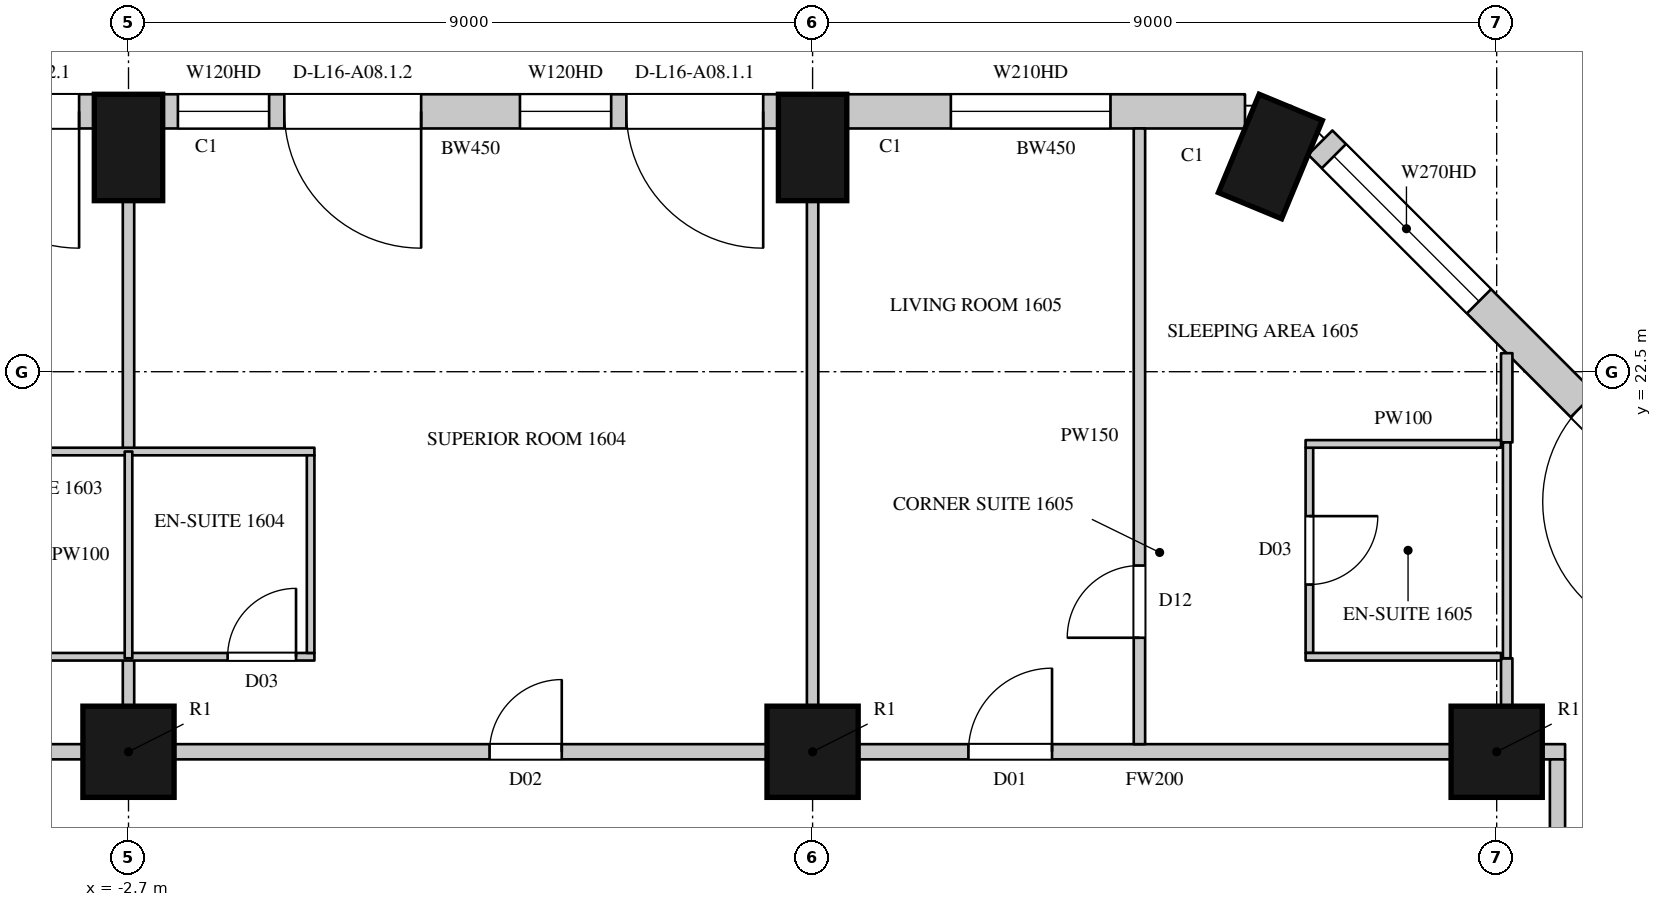
"""IFC4 building model, lengths in metres.
Left out: names, types, materials, properties, quantities, classifications, styles, units other than length and angle.
Written with IfcOpenShell. Run it as: python <this file> out.ifc"""

import sys

from ifc_helpers import new_model, si_unit, direction, frame, frame_2d, origin, origin_2d, place, context, subcontext, project, spatial, rectangle, circle, extrude, element, fill, save


model = new_model("IFC4")
c1 = context("Model", 3, precision=1e-05, world=origin(), true_north=direction((0.0, 1.0)))
c2 = subcontext(c1, "Body", "Model", "MODEL_VIEW")
j1 = project(units=[si_unit("LENGTHUNIT", "METRE"), si_unit("PLANEANGLEUNIT", "RADIAN")], contexts=[c1])
p1 = place(None, origin())
s1 = spatial("IfcSite", under=j1, at=p1, CompositionType="ELEMENT")
p2 = place(p1, origin())
s2 = spatial("IfcBuilding", under=s1, at=p2, CompositionType="ELEMENT")
p3 = place(p2, frame((0.0, 0.0, 87.9)))
s3 = spatial("IfcBuildingStorey", under=s2, at=p3, CompositionType="ELEMENT", Elevation=87.9)
for number, where, z_axis, x_axis in (
    (1, (12.323, 25.331, 0.0), (0.0, 0.0, 1.0), (-0.924, 0.383, 0.0)),
    (2, (6.3, 25.45, 0.0), (0.0, 0.0, 1.0), (-1.0, 0.0, 0.0)),
    (3, (-2.7, 25.45, 0.0), (0.0, 0.0, 1.0), (-1.0, 0.0, 0.0)),
):
    element("IfcColumn", number, at=place(p3, frame(where, z_axis=z_axis, x_axis=x_axis)), inside=s3, PredefinedType="COLUMN", context=c2, shape_type="SweptSolid", body=[
        extrude(rectangle(XDim=0.9, YDim=1.4, at=origin_2d()), origin(), (0.0, 0.0, 1.0), 3.6),
    ])
for number, where, z_axis, x_axis in (
    (4, (-2.7, 17.5, 0.0), (0.0, 0.0, 1.0), (1.0, 0.0, 0.0)),
    (5, (6.3, 17.5, 0.0), (0.0, 0.0, 1.0), (1.0, 0.0, 0.0)),
    (6, (15.3, 17.5, 0.0), (0.0, 0.0, 1.0), (1.0, 0.0, 0.0)),
):
    element("IfcColumn", number, at=place(p3, frame(where, z_axis=z_axis, x_axis=x_axis)), inside=s3, PredefinedType="COLUMN", context=c2, shape_type="SweptSolid", body=[
        extrude(circle(Radius=0.6, at=origin_2d()), origin(), (0.0, 0.0, 1.0), 3.6),
    ])
p4 = place(p3, frame((18.229, 20.265, 0.0), z_axis=(0.0, 0.0, 1.0), x_axis=(-0.707106781187, 0.707106781187, 0.0)))
e7 = element("IfcWall", 7, at=p4, inside=s3, PredefinedType="SOLIDWALL", context=c2, shape_type="SweptSolid", body=[
    extrude(rectangle(XDim=7.424, YDim=0.45, at=frame_2d((3.712, 0.0))), origin(), (0.0, 0.0, 1.0), 3.3),
])
p5 = place(p4, frame((0.74, 0.0, 0.0)))
e8 = element("IfcOpeningElement", 8, at=p5, cuts=e7, PredefinedType="OPENING", context=c2, shape_type="SweptSolid", body=[
    extrude(rectangle(XDim=1.8, YDim=2.4, at=frame_2d((0.9, 1.2))), frame((0.0, 0.235, 0.0), z_axis=(0.0, -1.0, 0.0), x_axis=(1.0, 0.0, 0.0)), (0.0, 0.0, 1.0), 0.47),
])
p6 = place(p4, frame((4.471, 0.0, 1.05)))
e9 = element("IfcOpeningElement", 9, at=p6, cuts=e7, PredefinedType="OPENING", context=c2, shape_type="SweptSolid", body=[
    extrude(rectangle(XDim=2.7, YDim=2.0, at=frame_2d((1.35, 1.0))), frame((0.0, 0.235, 0.0), z_axis=(0.0, -1.0, 0.0), x_axis=(1.0, 0.0, 0.0)), (0.0, 0.0, 1.0), 0.47),
])
p7 = place(p3, frame((11.989, 25.925, 0.0), z_axis=(0.0, 0.0, 1.0), x_axis=(-1.0, 0.0, 0.0)))
e10 = element("IfcWall", 10, at=p7, inside=s3, PredefinedType="SOLIDWALL", context=c2, shape_type="SweptSolid", body=[
    extrude(rectangle(XDim=5.239, YDim=0.45, at=frame_2d((2.619, 0.0))), origin(), (0.0, 0.0, 1.0), 3.3),
])
p8 = place(p7, frame((1.77, 0.0, 1.05)))
e11 = element("IfcOpeningElement", 11, at=p8, cuts=e10, PredefinedType="OPENING", context=c2, shape_type="SweptSolid", body=[
    extrude(rectangle(XDim=2.1, YDim=2.0, at=frame_2d((1.05, 1.0))), frame((0.0, 0.235, 0.0), z_axis=(0.0, -1.0, 0.0), x_axis=(1.0, 0.0, 0.0)), (0.0, 0.0, 1.0), 0.47),
])
p9 = place(p3, frame((5.85, 25.925, 0.0), z_axis=(0.0, 0.0, 1.0), x_axis=(-1.0, 0.0, 0.0)))
e12 = element("IfcWall", 12, at=p9, inside=s3, PredefinedType="SOLIDWALL", context=c2, shape_type="SweptSolid", body=[
    extrude(rectangle(XDim=8.1, YDim=0.45, at=frame_2d((4.05, 0.0))), origin(), (0.0, 0.0, 1.0), 3.3),
])
p10 = place(p9, frame((0.2, 0.0, 0.0)))
e13 = element("IfcOpeningElement", 13, at=p10, cuts=e12, PredefinedType="OPENING", context=c2, shape_type="SweptSolid", body=[
    extrude(rectangle(XDim=1.8, YDim=2.4, at=frame_2d((0.9, 1.2))), frame((0.0, 0.235, 0.0), z_axis=(0.0, -1.0, 0.0), x_axis=(1.0, 0.0, 0.0)), (0.0, 0.0, 1.0), 0.47),
])
p11 = place(p9, frame((2.2, 0.0, 1.05)))
e14 = element("IfcOpeningElement", 14, at=p11, cuts=e12, PredefinedType="OPENING", context=c2, shape_type="SweptSolid", body=[
    extrude(rectangle(XDim=1.2, YDim=2.0, at=frame_2d((0.6, 1.0))), frame((0.0, 0.235, 0.0), z_axis=(0.0, -1.0, 0.0), x_axis=(1.0, 0.0, 0.0)), (0.0, 0.0, 1.0), 0.47),
])
p12 = place(p9, frame((4.7, 0.0, 0.0)))
e15 = element("IfcOpeningElement", 15, at=p12, cuts=e12, PredefinedType="OPENING", context=c2, shape_type="SweptSolid", body=[
    extrude(rectangle(XDim=1.8, YDim=2.4, at=frame_2d((0.9, 1.2))), frame((0.0, 0.235, 0.0), z_axis=(0.0, -1.0, 0.0), x_axis=(1.0, 0.0, 0.0)), (0.0, 0.0, 1.0), 0.47),
])
p13 = place(p9, frame((6.7, 0.0, 1.05)))
e16 = element("IfcOpeningElement", 16, at=p13, cuts=e12, PredefinedType="OPENING", context=c2, shape_type="SweptSolid", body=[
    extrude(rectangle(XDim=1.2, YDim=2.0, at=frame_2d((0.6, 1.0))), frame((0.0, 0.235, 0.0), z_axis=(0.0, -1.0, 0.0), x_axis=(1.0, 0.0, 0.0)), (0.0, 0.0, 1.0), 0.47),
])
p14 = place(p3, frame((-3.15, 25.925, 0.0), z_axis=(0.0, 0.0, 1.0), x_axis=(-1.0, 0.0, 0.0)))
e17 = element("IfcWall", 17, at=p14, inside=s3, PredefinedType="SOLIDWALL", context=c2, shape_type="SweptSolid", body=[
    extrude(rectangle(XDim=8.1, YDim=0.45, at=frame_2d((4.05, 0.0))), origin(), (0.0, 0.0, 1.0), 3.3),
])
p15 = place(p14, frame((0.2, 0.0, 0.0)))
e18 = element("IfcOpeningElement", 18, at=p15, cuts=e17, PredefinedType="OPENING", context=c2, shape_type="SweptSolid", body=[
    extrude(rectangle(XDim=1.8, YDim=2.4, at=frame_2d((0.9, 1.2))), frame((0.0, 0.235, 0.0), z_axis=(0.0, -1.0, 0.0), x_axis=(1.0, 0.0, 0.0)), (0.0, 0.0, 1.0), 0.47),
])
p16 = place(p14, frame((2.2, 0.0, 1.05)))
e19 = element("IfcOpeningElement", 19, at=p16, cuts=e17, PredefinedType="OPENING", context=c2, shape_type="SweptSolid", body=[
    extrude(rectangle(XDim=1.2, YDim=2.0, at=frame_2d((0.6, 1.0))), frame((0.0, 0.235, 0.0), z_axis=(0.0, -1.0, 0.0), x_axis=(1.0, 0.0, 0.0)), (0.0, 0.0, 1.0), 0.47),
])
p17 = place(p14, frame((4.7, 0.0, 0.0)))
e20 = element("IfcOpeningElement", 20, at=p17, cuts=e17, PredefinedType="OPENING", context=c2, shape_type="SweptSolid", body=[
    extrude(rectangle(XDim=1.8, YDim=2.4, at=frame_2d((0.9, 1.2))), frame((0.0, 0.235, 0.0), z_axis=(0.0, -1.0, 0.0), x_axis=(1.0, 0.0, 0.0)), (0.0, 0.0, 1.0), 0.47),
])
p18 = place(p14, frame((6.7, 0.0, 1.05)))
e21 = element("IfcOpeningElement", 21, at=p18, cuts=e17, PredefinedType="OPENING", context=c2, shape_type="SweptSolid", body=[
    extrude(rectangle(XDim=1.2, YDim=2.0, at=frame_2d((0.6, 1.0))), frame((0.0, 0.235, 0.0), z_axis=(0.0, -1.0, 0.0), x_axis=(1.0, 0.0, 0.0)), (0.0, 0.0, 1.0), 0.47),
])
p19 = place(p3, frame((16.486, 23.529, 0.0), z_axis=(0.0, 0.0, 1.0), x_axis=(-0.707022305137, 0.707191247145, 0.0)))
e22 = element("IfcWall", 22, at=p19, inside=s3, PredefinedType="SOLIDWALL", context=c2, shape_type="SweptSolid", body=[
    extrude(rectangle(XDim=1.445, YDim=0.45, at=frame_2d((0.723, 0.0))), origin(), (0.0, 0.0, 1.0), 0.6),
])
p20 = place(p3, frame((-11.1, 17.5, 0.0), z_axis=(0.0, 0.0, 1.0), x_axis=(1.0, 0.0, 0.0)))
e23 = element("IfcWall", 23, at=p20, inside=s3, PredefinedType="PARTITIONING", context=c2, shape_type="SweptSolid", body=[
    extrude(rectangle(XDim=7.8, YDim=0.2, at=frame_2d((3.9, 0.0))), origin(), (0.0, 0.0, 1.0), 2.75),
])
p21 = place(p20, frame((4.45, 0.0, 0.0)))
e24 = element("IfcOpeningElement", 24, at=p21, cuts=e23, PredefinedType="OPENING", context=c2, shape_type="SweptSolid", body=[
    extrude(rectangle(XDim=0.95, YDim=2.2, at=frame_2d((0.475, 1.1))), frame((0.0, 0.11, 0.0), z_axis=(0.0, -1.0, 0.0), x_axis=(1.0, 0.0, 0.0)), (0.0, 0.0, 1.0), 0.22),
])
p22 = place(p3, frame((-2.1, 17.5, 0.0), z_axis=(0.0, 0.0, 1.0), x_axis=(1.0, 0.0, 0.0)))
e25 = element("IfcWall", 25, at=p22, inside=s3, PredefinedType="PARTITIONING", context=c2, shape_type="SweptSolid", body=[
    extrude(rectangle(XDim=7.8, YDim=0.2, at=frame_2d((3.9, 0.0))), origin(), (0.0, 0.0, 1.0), 2.75),
])
p23 = place(p22, frame((4.15, 0.0, 0.0)))
e26 = element("IfcOpeningElement", 26, at=p23, cuts=e25, PredefinedType="OPENING", context=c2, shape_type="SweptSolid", body=[
    extrude(rectangle(XDim=0.95, YDim=2.2, at=frame_2d((0.475, 1.1))), frame((0.0, 0.11, 0.0), z_axis=(0.0, -1.0, 0.0), x_axis=(1.0, 0.0, 0.0)), (0.0, 0.0, 1.0), 0.22),
])
p24 = place(p3, frame((6.9, 17.5, 0.0), z_axis=(0.0, 0.0, 1.0), x_axis=(1.0, 0.0, 0.0)))
e27 = element("IfcWall", 27, at=p24, inside=s3, PredefinedType="PARTITIONING", context=c2, shape_type="SweptSolid", body=[
    extrude(rectangle(XDim=7.8, YDim=0.2, at=frame_2d((3.9, 0.0))), origin(), (0.0, 0.0, 1.0), 2.75),
])
p25 = place(p24, frame((1.45, 0.0, 0.0)))
e28 = element("IfcOpeningElement", 28, at=p25, cuts=e27, PredefinedType="OPENING", context=c2, shape_type="SweptSolid", body=[
    extrude(rectangle(XDim=1.1, YDim=2.4, at=frame_2d((0.55, 1.2))), frame((0.0, 0.11, 0.0), z_axis=(0.0, -1.0, 0.0), x_axis=(1.0, 0.0, 0.0)), (0.0, 0.0, 1.0), 0.22),
])
p26 = place(p3, frame((15.9, 17.5, 0.0), z_axis=(0.0, 0.0, 1.0), x_axis=(1.0, 0.0, 0.0)))
e29 = element("IfcWall", 29, at=p26, inside=s3, PredefinedType="PARTITIONING", context=c2, shape_type="SweptSolid", body=[
    extrude(rectangle(XDim=0.3, YDim=0.2, at=frame_2d((0.15, 0.0))), origin(), (0.0, 0.0, 1.0), 3.3),
])
p27 = place(p3, frame((16.1, 4.75, 0.0), z_axis=(0.0, 0.0, 1.0), x_axis=(0.0, 1.0, 0.0)))
e30 = element("IfcWall", 30, at=p27, inside=s3, PredefinedType="PARTITIONING", context=c2, shape_type="SweptSolid", body=[
    extrude(rectangle(XDim=12.65, YDim=0.2, at=frame_2d((6.325, 0.0))), origin(), (0.0, 0.0, 1.0), 3.3),
])
p28 = place(p27, frame((0.5, 0.0, 0.0)))
e31 = element("IfcOpeningElement", 31, at=p28, cuts=e30, PredefinedType="OPENING", context=c2, shape_type="SweptSolid", body=[
    extrude(rectangle(XDim=0.95, YDim=2.2, at=frame_2d((0.475, 1.1))), frame((0.0, 0.11, 0.0), z_axis=(0.0, -1.0, 0.0), x_axis=(1.0, 0.0, 0.0)), (0.0, 0.0, 1.0), 0.22),
])
p29 = place(p27, frame((6.9, 0.0, 0.0)))
e32 = element("IfcOpeningElement", 32, at=p29, cuts=e30, PredefinedType="OPENING", context=c2, shape_type="SweptSolid", body=[
    extrude(rectangle(XDim=0.95, YDim=2.2, at=frame_2d((0.475, 1.1))), frame((0.0, 0.11, 0.0), z_axis=(0.0, -1.0, 0.0), x_axis=(1.0, 0.0, 0.0)), (0.0, 0.0, 1.0), 0.22),
])
p30 = place(p3, frame((-2.7, 18.1, 0.0), z_axis=(0.0, 0.0, 1.0), x_axis=(0.0, 1.0, 0.0)))
e33 = element("IfcWall", 33, at=p30, inside=s3, PredefinedType="PARTITIONING", context=c2, shape_type="SweptSolid", body=[
    extrude(rectangle(XDim=0.63, YDim=0.15, at=frame_2d((0.315, 0.0))), origin(), (0.0, 0.0, 1.0), 2.75),
])
p31 = place(p3, frame((-2.7, 21.45, 0.0), z_axis=(0.0, 0.0, 1.0), x_axis=(0.0, 1.0, 0.0)))
e34 = element("IfcWall", 34, at=p31, inside=s3, PredefinedType="PARTITIONING", context=c2, shape_type="SweptSolid", body=[
    extrude(rectangle(XDim=3.3, YDim=0.15, at=frame_2d((1.65, 0.0))), origin(), (0.0, 0.0, 1.0), 2.75),
])
p32 = place(p3, frame((6.3, 18.1, 0.0), z_axis=(0.0, 0.0, 1.0), x_axis=(0.0, 1.0, 0.0)))
e35 = element("IfcWall", 35, at=p32, inside=s3, PredefinedType="PARTITIONING", context=c2, shape_type="SweptSolid", body=[
    extrude(rectangle(XDim=6.65, YDim=0.15, at=frame_2d((3.325, 0.0))), origin(), (0.0, 0.0, 1.0), 2.75),
])
p33 = place(p3, frame((10.6, 17.6, 0.0), z_axis=(0.0, 0.0, 1.0), x_axis=(0.0, 1.0, 0.0)))
e36 = element("IfcWall", 36, at=p33, inside=s3, PredefinedType="PARTITIONING", context=c2, shape_type="SweptSolid", body=[
    extrude(rectangle(XDim=8.1, YDim=0.15, at=frame_2d((4.05, 0.0))), origin(), (0.0, 0.0, 1.0), 3.3),
])
p34 = place(p33, frame((1.4, 0.0, 0.0)))
e37 = element("IfcOpeningElement", 37, at=p34, cuts=e36, PredefinedType="OPENING", context=c2, shape_type="SweptSolid", body=[
    extrude(rectangle(XDim=0.95, YDim=2.2, at=frame_2d((0.475, 1.1))), frame((0.0, 0.085, 0.0), z_axis=(0.0, -1.0, 0.0), x_axis=(1.0, 0.0, 0.0)), (0.0, 0.0, 1.0), 0.17),
])
p35 = place(p3, frame((15.432, 18.094, 0.0), z_axis=(0.0, 0.0, 1.0), x_axis=(0.0, 1.0, 0.0)))
e38 = element("IfcWall", 38, at=p35, inside=s3, PredefinedType="PARTITIONING", context=c2, shape_type="SweptSolid", body=[
    extrude(rectangle(XDim=0.636, YDim=0.15, at=frame_2d((0.318, 0.0))), origin(), (0.0, 0.0, 1.0), 3.3),
])
p36 = place(p3, frame((15.432, 21.57, 0.0), z_axis=(0.0, 0.0, 1.0), x_axis=(0.0, 1.0, 0.0)))
e39 = element("IfcWall", 39, at=p36, inside=s3, PredefinedType="PARTITIONING", context=c2, shape_type="SweptSolid", body=[
    extrude(rectangle(XDim=1.174, YDim=0.15, at=frame_2d((0.587, 0.0))), origin(), (0.0, 0.0, 1.0), 3.3),
])
p37 = place(p3, frame((-5.146, 18.75, 0.0), z_axis=(0.0, 0.0, 1.0), x_axis=(1.0, 0.0, 0.0)))
e40 = element("IfcWall", 40, at=p37, inside=s3, PredefinedType="PARTITIONING", context=c2, shape_type="SweptSolid", body=[
    extrude(rectangle(XDim=4.892, YDim=0.1, at=frame_2d((2.446, 0.0))), origin(), (0.0, 0.0, 1.0), 3.3),
])
p38 = place(p37, frame((3.75, 0.0, 0.0)))
e41 = element("IfcOpeningElement", 41, at=p38, cuts=e40, PredefinedType="OPENING", context=c2, shape_type="SweptSolid", body=[
    extrude(rectangle(XDim=0.9, YDim=2.2, at=frame_2d((0.45, 1.1))), frame((0.0, 0.06, 0.0), z_axis=(0.0, -1.0, 0.0), x_axis=(1.0, 0.0, 0.0)), (0.0, 0.0, 1.0), 0.12),
])
p39 = place(p3, frame((-5.146, 21.45, 0.0), z_axis=(0.0, 0.0, 1.0), x_axis=(1.0, 0.0, 0.0)))
e42 = element("IfcWall", 42, at=p39, inside=s3, PredefinedType="PARTITIONING", context=c2, shape_type="SweptSolid", body=[
    extrude(rectangle(XDim=4.892, YDim=0.1, at=frame_2d((2.446, 0.0))), origin(), (0.0, 0.0, 1.0), 3.3),
])
p40 = place(p3, frame((-2.7, 18.73, 0.0), z_axis=(0.0, 0.0, 1.0), x_axis=(0.0, 1.0, 0.0)))
e43 = element("IfcWall", 43, at=p40, inside=s3, PredefinedType="PARTITIONING", context=c2, shape_type="SweptSolid", body=[
    extrude(rectangle(XDim=2.72, YDim=0.1, at=frame_2d((1.36, 0.0))), origin(), (0.0, 0.0, 1.0), 2.75),
])
p41 = place(p3, frame((-0.304, 18.8, 0.0), z_axis=(0.0, 0.0, 1.0), x_axis=(0.0, 1.0, 0.0)))
e44 = element("IfcWall", 44, at=p41, inside=s3, PredefinedType="PARTITIONING", context=c2, shape_type="SweptSolid", body=[
    extrude(rectangle(XDim=2.6, YDim=0.1, at=frame_2d((1.3, 0.0))), origin(), (0.0, 0.0, 1.0), 3.3),
])
p42 = place(p3, frame((12.836, 18.8, 0.0), z_axis=(0.0, 0.0, 1.0), x_axis=(0.0, 1.0, 0.0)))
e45 = element("IfcWall", 45, at=p42, inside=s3, PredefinedType="PARTITIONING", context=c2, shape_type="SweptSolid", body=[
    extrude(rectangle(XDim=2.7, YDim=0.1, at=frame_2d((1.35, 0.0))), origin(), (0.0, 0.0, 1.0), 3.3),
])
p43 = place(p42, frame((0.9, 0.0, 0.0)))
e46 = element("IfcOpeningElement", 46, at=p43, cuts=e45, PredefinedType="OPENING", context=c2, shape_type="SweptSolid", body=[
    extrude(rectangle(XDim=0.9, YDim=2.2, at=frame_2d((0.45, 1.1))), frame((0.0, 0.06, 0.0), z_axis=(0.0, -1.0, 0.0), x_axis=(1.0, 0.0, 0.0)), (0.0, 0.0, 1.0), 0.12),
])
for number, where, z_axis, x_axis in (
    (47, (12.786, 18.75, 0.0), (0.0, 0.0, 1.0), (1.0, 0.0, 0.0)),
    (48, (12.786, 21.55, 0.0), (0.0, 0.0, 1.0), (1.0, 0.0, 0.0)),
):
    element("IfcWall", number, at=place(p3, frame(where, z_axis=z_axis, x_axis=x_axis)), inside=s3, PredefinedType="PARTITIONING", context=c2, shape_type="SweptSolid", body=[
        extrude(rectangle(XDim=2.571, YDim=0.1, at=frame_2d((1.286, 0.0))), origin(), (0.0, 0.0, 1.0), 3.3),
    ])
p44 = place(p3, frame((15.432, 18.73, 0.0), z_axis=(0.0, 0.0, 1.0), x_axis=(0.0, 1.0, 0.0)))
e49 = element("IfcWall", 49, at=p44, inside=s3, PredefinedType="PARTITIONING", context=c2, shape_type="SweptSolid", body=[
    extrude(rectangle(XDim=2.84, YDim=0.1, at=frame_2d((1.42, 0.0))), origin(), (0.0, 0.0, 1.0), 3.3),
])
p45 = place(p5, origin())
e50 = element("IfcDoor", 50, at=p45, inside=s3, OperationType="SLIDING_TO_LEFT", PredefinedType="DOOR", context=c2, shape_type="SweptSolid", body=[
    extrude(rectangle(XDim=1.8, YDim=2.4, at=frame_2d((0.9, 1.2))), frame((0.0, 0.13, 0.0), z_axis=(0.0, -1.0, 0.0), x_axis=(1.0, 0.0, 0.0)), (0.0, 0.0, 1.0), 0.05),
])
fill(e8, e50)
p46 = place(p6, origin())
e51 = element("IfcWindow", 51, at=p46, inside=s3, PartitioningType="SINGLE_PANEL", PredefinedType="WINDOW", context=c2, shape_type="SweptSolid", body=[
    extrude(rectangle(XDim=2.7, YDim=2.0, at=frame_2d((1.35, 1.0))), frame((0.0, 0.135, 0.0), z_axis=(0.0, -1.0, 0.0), x_axis=(1.0, 0.0, 0.0)), (0.0, 0.0, 1.0), 0.06),
])
fill(e9, e51)
p47 = place(p10, origin())
e52 = element("IfcDoor", 52, at=p47, inside=s3, OperationType="SLIDING_TO_LEFT", PredefinedType="DOOR", context=c2, shape_type="SweptSolid", body=[
    extrude(rectangle(XDim=1.8, YDim=2.4, at=frame_2d((0.9, 1.2))), frame((0.0, 0.13, 0.0), z_axis=(0.0, -1.0, 0.0), x_axis=(1.0, 0.0, 0.0)), (0.0, 0.0, 1.0), 0.05),
])
fill(e13, e52)
p48 = place(p11, origin())
e53 = element("IfcWindow", 53, at=p48, inside=s3, PartitioningType="SINGLE_PANEL", PredefinedType="WINDOW", context=c2, shape_type="SweptSolid", body=[
    extrude(rectangle(XDim=1.2, YDim=2.0, at=frame_2d((0.6, 1.0))), frame((0.0, 0.135, 0.0), z_axis=(0.0, -1.0, 0.0), x_axis=(1.0, 0.0, 0.0)), (0.0, 0.0, 1.0), 0.06),
])
fill(e14, e53)
p49 = place(p12, origin())
e54 = element("IfcDoor", 54, at=p49, inside=s3, OperationType="SLIDING_TO_LEFT", PredefinedType="DOOR", context=c2, shape_type="SweptSolid", body=[
    extrude(rectangle(XDim=1.8, YDim=2.4, at=frame_2d((0.9, 1.2))), frame((0.0, 0.13, 0.0), z_axis=(0.0, -1.0, 0.0), x_axis=(1.0, 0.0, 0.0)), (0.0, 0.0, 1.0), 0.05),
])
fill(e15, e54)
p50 = place(p13, origin())
e55 = element("IfcWindow", 55, at=p50, inside=s3, PartitioningType="SINGLE_PANEL", PredefinedType="WINDOW", context=c2, shape_type="SweptSolid", body=[
    extrude(rectangle(XDim=1.2, YDim=2.0, at=frame_2d((0.6, 1.0))), frame((0.0, 0.135, 0.0), z_axis=(0.0, -1.0, 0.0), x_axis=(1.0, 0.0, 0.0)), (0.0, 0.0, 1.0), 0.06),
])
fill(e16, e55)
p51 = place(p15, origin())
e56 = element("IfcDoor", 56, at=p51, inside=s3, OperationType="SLIDING_TO_LEFT", PredefinedType="DOOR", context=c2, shape_type="SweptSolid", body=[
    extrude(rectangle(XDim=1.8, YDim=2.4, at=frame_2d((0.9, 1.2))), frame((0.0, 0.13, 0.0), z_axis=(0.0, -1.0, 0.0), x_axis=(1.0, 0.0, 0.0)), (0.0, 0.0, 1.0), 0.05),
])
fill(e18, e56)
p52 = place(p23, origin())
e57 = element("IfcDoor", 57, at=p52, inside=s3, OperationType="SINGLE_SWING_RIGHT", PredefinedType="DOOR", context=c2, shape_type="SweptSolid", body=[
    extrude(rectangle(XDim=0.95, YDim=2.2, at=frame_2d((0.475, 1.1))), frame((0.0, 0.025, 0.0), z_axis=(0.0, -1.0, 0.0), x_axis=(1.0, 0.0, 0.0)), (0.0, 0.0, 1.0), 0.05),
])
fill(e26, e57)
p53 = place(p38, origin())
e58 = element("IfcDoor", 58, at=p53, inside=s3, OperationType="SINGLE_SWING_RIGHT", PredefinedType="DOOR", context=c2, shape_type="SweptSolid", body=[
    extrude(rectangle(XDim=0.9, YDim=2.2, at=frame_2d((0.45, 1.1))), frame((0.0, 0.025, 0.0), z_axis=(0.0, -1.0, 0.0), x_axis=(1.0, 0.0, 0.0)), (0.0, 0.0, 1.0), 0.05),
])
fill(e41, e58)
p54 = place(p25, origin())
e59 = element("IfcDoor", 59, at=p54, inside=s3, OperationType="SINGLE_SWING_RIGHT", PredefinedType="DOOR", context=c2, shape_type="SweptSolid", body=[
    extrude(rectangle(XDim=1.1, YDim=2.4, at=frame_2d((0.55, 1.2))), frame((0.0, 0.025, 0.0), z_axis=(0.0, -1.0, 0.0), x_axis=(1.0, 0.0, 0.0)), (0.0, 0.0, 1.0), 0.05),
])
fill(e28, e59)
p55 = place(p34, origin())
e60 = element("IfcDoor", 60, at=p55, inside=s3, OperationType="SINGLE_SWING_LEFT", PredefinedType="DOOR", context=c2, shape_type="SweptSolid", body=[
    extrude(rectangle(XDim=0.95, YDim=2.2, at=frame_2d((0.475, 1.1))), frame((0.0, 0.025, 0.0), z_axis=(0.0, -1.0, 0.0), x_axis=(1.0, 0.0, 0.0)), (0.0, 0.0, 1.0), 0.05),
])
fill(e37, e60)
p56 = place(p43, origin())
e61 = element("IfcDoor", 61, at=p56, inside=s3, OperationType="SINGLE_SWING_LEFT", PredefinedType="DOOR", context=c2, shape_type="SweptSolid", body=[
    extrude(rectangle(XDim=0.9, YDim=2.2, at=frame_2d((0.45, 1.1))), frame((0.0, 0.025, 0.0), z_axis=(0.0, -1.0, 0.0), x_axis=(1.0, 0.0, 0.0)), (0.0, 0.0, 1.0), 0.05),
])
fill(e46, e61)
p57 = place(p8, origin())
e62 = element("IfcWindow", 62, at=p57, inside=s3, PartitioningType="SINGLE_PANEL", PredefinedType="WINDOW", context=c2, shape_type="SweptSolid", body=[
    extrude(rectangle(XDim=2.1, YDim=2.0, at=frame_2d((1.05, 1.0))), frame((0.0, 0.135, 0.0), z_axis=(0.0, -1.0, 0.0), x_axis=(1.0, 0.0, 0.0)), (0.0, 0.0, 1.0), 0.06),
])
fill(e11, e62)
save(model, sys.argv[1])
